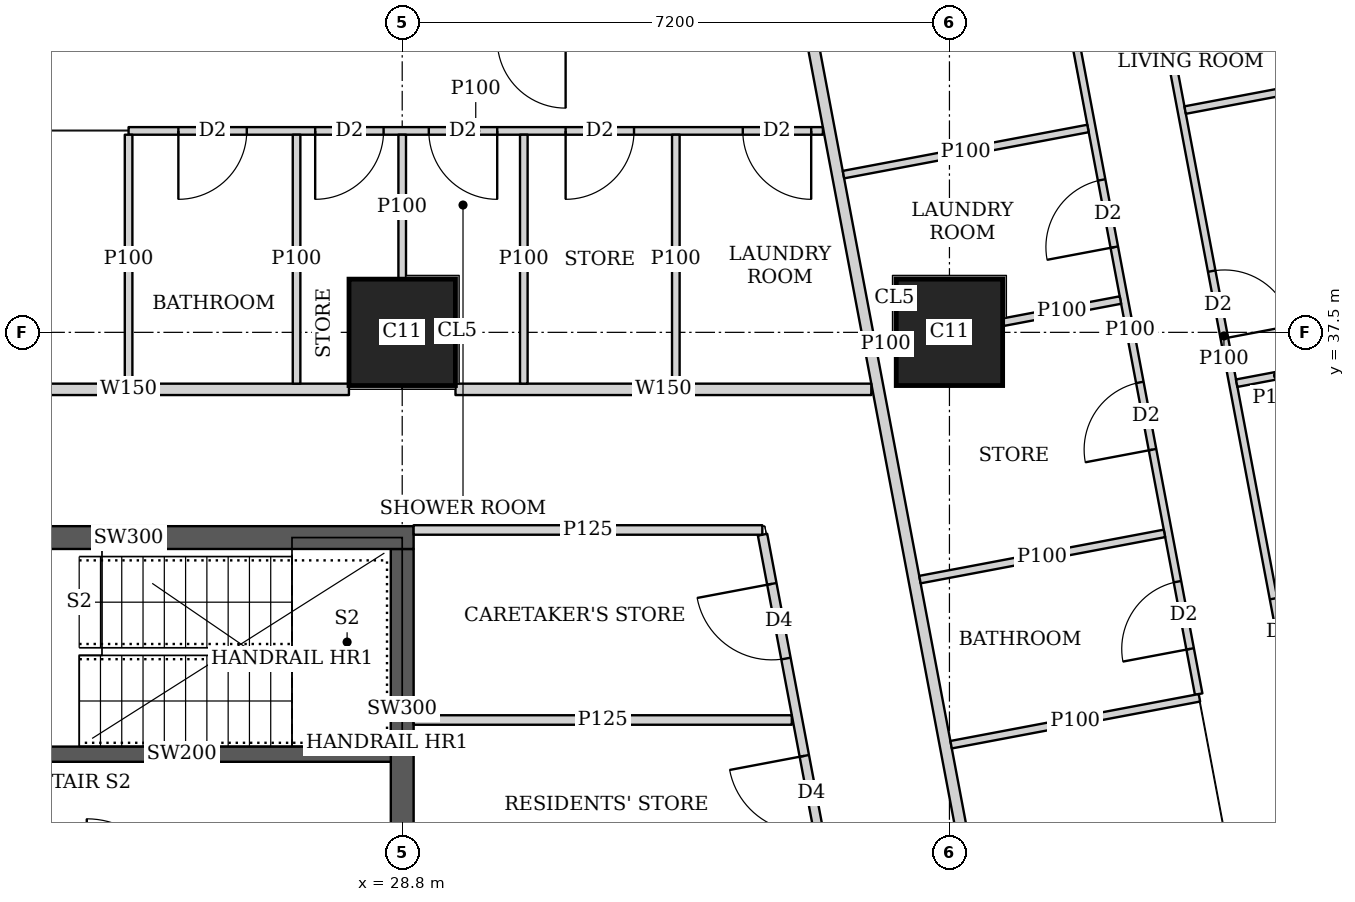
"""IFC4 building model, lengths in metres.
Left out: names, types, materials, properties, quantities, classifications, styles, units other than length and angle.
Written with IfcOpenShell. Run it as: python <this file> out.ifc"""

import sys

from ifc_helpers import new_model, si_unit, direction, frame, frame_2d, origin, origin_2d, place, context, subcontext, project, spatial, rectangle, extrude, element, fill, save


model = new_model("IFC4")
c1 = context("Model", 3, precision=1e-05, world=origin(), true_north=direction((0.0, 1.0)))
c2 = subcontext(c1, "Body", "Model", "MODEL_VIEW")
j1 = project(units=[si_unit("LENGTHUNIT", "METRE"), si_unit("PLANEANGLEUNIT", "RADIAN")], contexts=[c1])
p1 = place(None, origin())
s1 = spatial("IfcSite", under=j1, at=p1, CompositionType="ELEMENT")
p2 = place(p1, origin())
s2 = spatial("IfcBuilding", under=s1, at=p2, CompositionType="ELEMENT")
p3 = place(p2, frame((0.0, 0.0, 242.45)))
s3 = spatial("IfcBuildingStorey", under=s2, at=p3, CompositionType="ELEMENT", Elevation=242.45)
for number, where, z_axis, x_axis in (
    (1, (28.8, 37.5, 0.0), (0.0, 0.0, 1.0), (1.0, 0.0, 0.0)),
    (2, (36.0, 37.5, 0.0), (0.0, 0.0, 1.0), (1.0, 0.0, 0.0)),
):
    element("IfcColumn", number, at=place(p3, frame(where, z_axis=z_axis, x_axis=x_axis)), inside=s3, PredefinedType="COLUMN", context=c2, shape_type="SweptSolid", body=[
        extrude(rectangle(XDim=1.4, YDim=1.4, at=origin_2d()), origin(), (0.0, 0.0, 1.0), 3.75),
    ])
p4 = place(p3, frame((21.45, 34.8, 0.0), z_axis=(0.0, 0.0, 1.0), x_axis=(1.0, 0.0, 0.0)))
e3 = element("IfcWall", 3, at=p4, inside=s3, PredefinedType="SHEAR", context=c2, shape_type="SweptSolid", body=[
    extrude(rectangle(XDim=7.5, YDim=0.3, at=frame_2d((3.75, 0.0))), origin(), (0.0, 0.0, 1.0), 3.75),
])
p5 = place(p4, frame((0.5, 0.0, 0.0)))
e4 = element("IfcOpeningElement", 4, at=p5, cuts=e3, PredefinedType="OPENING", context=c2, shape_type="SweptSolid", body=[
    extrude(rectangle(XDim=1.1, YDim=2.1, at=frame_2d((0.55, 1.05))), frame((0.0, 0.16, 0.0), z_axis=(0.0, -1.0, 0.0), x_axis=(1.0, 0.0, 0.0)), (0.0, 0.0, 1.0), 0.32),
])
p6 = place(p3, frame((28.8, 30.45, 0.0), z_axis=(0.0, 0.0, 1.0), x_axis=(0.0, 1.0, 0.0)))
e5 = element("IfcWall", 5, at=p6, inside=s3, PredefinedType="SHEAR", context=c2, shape_type="SweptSolid", body=[
    extrude(rectangle(XDim=4.2, YDim=0.3, at=frame_2d((2.1, 0.0))), origin(), (0.0, 0.0, 1.0), 3.75),
])
p7 = place(p3, frame((22.301, 36.75, 0.0), z_axis=(0.0, 0.0, 1.0), x_axis=(1.0, 0.0, 0.0)))
e6 = element("IfcWall", 6, at=p7, inside=s3, PredefinedType="SOLIDWALL", context=c2, shape_type="SweptSolid", body=[
    extrude(rectangle(XDim=5.798, YDim=0.15, at=frame_2d((2.899, 0.0))), origin(), (0.0, 0.0, 1.0), 3.45),
])
p8 = place(p7, frame((0.799, 0.0, 0.0)))
e7 = element("IfcOpeningElement", 7, at=p8, cuts=e6, PredefinedType="OPENING", context=c2, shape_type="SweptSolid", body=[
    extrude(rectangle(XDim=1.0, YDim=2.1, at=frame_2d((0.5, 1.05))), frame((0.0, 0.085, 0.0), z_axis=(0.0, -1.0, 0.0), x_axis=(1.0, 0.0, 0.0)), (0.0, 0.0, 1.0), 0.17),
])
p9 = place(p3, frame((29.501, 36.75, 0.0), z_axis=(0.0, 0.0, 1.0), x_axis=(1.0, 0.0, 0.0)))
e8 = element("IfcWall", 8, at=p9, inside=s3, PredefinedType="SOLIDWALL", context=c2, shape_type="SweptSolid", body=[
    extrude(rectangle(XDim=5.471, YDim=0.15, at=frame_2d((2.735, 0.0))), origin(), (0.0, 0.0, 1.0), 3.45),
])
p10 = place(p3, frame((33.933, 42.73, 0.0), z_axis=(0.0, 0.0, 1.0), x_axis=(0.185595417643, -0.982626246825, 0.0)))
e9 = element("IfcWall", 9, at=p10, inside=s3, PredefinedType="SOLIDWALL", context=c2, shape_type="SweptSolid", body=[
    extrude(rectangle(XDim=41.051, YDim=0.15, at=frame_2d((20.525, 0.0))), origin(), (0.0, 0.0, 1.0), 2.45),
])
p11 = place(p10, frame((12.266, 0.0, 0.0)))
e10 = element("IfcOpeningElement", 10, at=p11, cuts=e9, PredefinedType="OPENING", context=c2, shape_type="SweptSolid", body=[
    extrude(rectangle(XDim=1.0, YDim=2.1, at=frame_2d((0.5, 1.05))), frame((0.0, 0.085, 0.0), z_axis=(0.0, -1.0, 0.0), x_axis=(1.0, 0.0, 0.0)), (0.0, 0.0, 1.0), 0.17),
])
p12 = place(p10, frame((16.082, 0.0, 0.0)))
e11 = element("IfcOpeningElement", 11, at=p12, cuts=e9, PredefinedType="OPENING", context=c2, shape_type="SweptSolid", body=[
    extrude(rectangle(XDim=1.0, YDim=2.1, at=frame_2d((0.5, 1.05))), frame((0.0, 0.085, 0.0), z_axis=(0.0, -1.0, 0.0), x_axis=(1.0, 0.0, 0.0)), (0.0, 0.0, 1.0), 0.17),
])
p13 = place(p10, frame((30.862, 0.0, 0.0)))
e12 = element("IfcOpeningElement", 12, at=p13, cuts=e9, PredefinedType="OPENING", context=c2, shape_type="SweptSolid", body=[
    extrude(rectangle(XDim=1.0, YDim=2.1, at=frame_2d((0.5, 1.05))), frame((0.0, 0.085, 0.0), z_axis=(0.0, -1.0, 0.0), x_axis=(1.0, 0.0, 0.0)), (0.0, 0.0, 1.0), 0.17),
])
p14 = place(p3, frame((38.764, 41.941, 0.0), z_axis=(0.0, 0.0, 1.0), x_axis=(0.185548572312, -0.982635093671, 0.0)))
e13 = element("IfcWall", 13, at=p14, inside=s3, PredefinedType="PARTITIONING", context=c2, shape_type="SweptSolid", body=[
    extrude(rectangle(XDim=9.135, YDim=0.1, at=frame_2d((4.568, 0.0))), origin(), (0.0, 0.0, 1.0), 3.45),
])
p15 = place(p14, frame((8.085, 0.0, 0.0)))
e14 = element("IfcOpeningElement", 14, at=p15, cuts=e13, PredefinedType="OPENING", context=c2, shape_type="SweptSolid", body=[
    extrude(rectangle(XDim=0.9, YDim=2.1, at=frame_2d((0.45, 1.05))), frame((0.0, 0.06, 0.0), z_axis=(0.0, -1.0, 0.0), x_axis=(1.0, 0.0, 0.0)), (0.0, 0.0, 1.0), 0.12),
])
p16 = place(p14, frame((3.7, 0.0, 0.0)))
e15 = element("IfcOpeningElement", 15, at=p16, cuts=e13, PredefinedType="OPENING", context=c2, shape_type="SweptSolid", body=[
    extrude(rectangle(XDim=0.9, YDim=2.1, at=frame_2d((0.45, 1.05))), frame((0.0, 0.06, 0.0), z_axis=(0.0, -1.0, 0.0), x_axis=(1.0, 0.0, 0.0)), (0.0, 0.0, 1.0), 0.12),
])
p17 = place(p3, frame((37.473, 42.309, 0.0), z_axis=(0.0, 0.0, 1.0), x_axis=(0.185491912953, -0.982645790827, 0.0)))
e16 = element("IfcWall", 16, at=p17, inside=s3, PredefinedType="PARTITIONING", context=c2, shape_type="SweptSolid", body=[
    extrude(rectangle(XDim=9.737, YDim=0.1, at=frame_2d((4.869, 0.0))), origin(), (0.0, 0.0, 1.0), 3.45),
])
p18 = place(p17, frame((8.232, 0.0, 0.0)))
e17 = element("IfcOpeningElement", 17, at=p18, cuts=e16, PredefinedType="OPENING", context=c2, shape_type="SweptSolid", body=[
    extrude(rectangle(XDim=0.9, YDim=2.1, at=frame_2d((0.45, 1.05))), frame((0.0, 0.06, 0.0), z_axis=(0.0, -1.0, 0.0), x_axis=(1.0, 0.0, 0.0)), (0.0, 0.0, 1.0), 0.12),
])
p19 = place(p17, frame((2.853, 0.0, 0.0)))
e18 = element("IfcOpeningElement", 18, at=p19, cuts=e16, PredefinedType="OPENING", context=c2, shape_type="SweptSolid", body=[
    extrude(rectangle(XDim=0.9, YDim=2.1, at=frame_2d((0.45, 1.05))), frame((0.0, 0.06, 0.0), z_axis=(0.0, -1.0, 0.0), x_axis=(1.0, 0.0, 0.0)), (0.0, 0.0, 1.0), 0.12),
])
p20 = place(p17, frame((5.564, 0.0, 0.0)))
e19 = element("IfcOpeningElement", 19, at=p20, cuts=e16, PredefinedType="OPENING", context=c2, shape_type="SweptSolid", body=[
    extrude(rectangle(XDim=0.9, YDim=2.1, at=frame_2d((0.45, 1.05))), frame((0.0, 0.06, 0.0), z_axis=(0.0, -1.0, 0.0), x_axis=(1.0, 0.0, 0.0)), (0.0, 0.0, 1.0), 0.12),
])
p21 = place(p3, frame((43.277, 41.212, 0.0), z_axis=(0.0, 0.0, 1.0), x_axis=(-0.982665405803, -0.185387972203, 0.0)))
e20 = element("IfcWall", 20, at=p21, inside=s3, PredefinedType="PARTITIONING", context=c2, shape_type="SweptSolid", body=[
    extrude(rectangle(XDim=4.25, YDim=0.1, at=frame_2d((2.125, 0.0))), origin(), (0.0, 0.0, 1.0), 2.0),
])
p22 = place(p3, frame((40.854, 37.034, 0.0), z_axis=(0.0, 0.0, 1.0), x_axis=(-0.982651678759, -0.185460718839, 0.0)))
e21 = element("IfcWall", 21, at=p22, inside=s3, PredefinedType="PARTITIONING", context=c2, shape_type="SweptSolid", body=[
    extrude(rectangle(XDim=1.094, YDim=0.1, at=frame_2d((0.547, 0.0))), origin(), (0.0, 0.0, 1.0), 3.45),
])
p23 = place(p3, frame((37.823, 40.182, 0.0), z_axis=(0.0, 0.0, 1.0), x_axis=(-0.982664729897, -0.18539155487, 0.0)))
e22 = element("IfcWall", 22, at=p23, inside=s3, PredefinedType="PARTITIONING", context=c2, shape_type="SweptSolid", body=[
    extrude(rectangle(XDim=3.274, YDim=0.1, at=frame_2d((1.637, 0.0))), origin(), (0.0, 0.0, 1.0), 3.45),
])
p24 = place(p3, frame((38.25, 37.925, 0.0), z_axis=(0.0, 0.0, 1.0), x_axis=(-0.982610209589, -0.185680305934, 0.0)))
e23 = element("IfcWall", 23, at=p24, inside=s3, PredefinedType="PARTITIONING", context=c2, shape_type="SweptSolid", body=[
    extrude(rectangle(XDim=1.567, YDim=0.1, at=frame_2d((0.784, 0.0))), origin(), (0.0, 0.0, 1.0), 3.45),
])
p25 = place(p3, frame((35.29, 37.366, 0.0), z_axis=(0.0, 0.0, 1.0), x_axis=(-0.982395465615, -0.18681313963, 0.0)))
e24 = element("IfcWall", 24, at=p25, inside=s3, PredefinedType="PARTITIONING", context=c2, shape_type="SweptSolid", body=[
    extrude(rectangle(XDim=0.263, YDim=0.1, at=frame_2d((0.131, 0.0))), origin(), (0.0, 0.0, 1.0), 3.45),
])
p26 = place(p3, frame((39.289, 32.692, 0.0), z_axis=(0.0, 0.0, 1.0), x_axis=(-0.982633623707, -0.185556356831, 0.0)))
e25 = element("IfcWall", 25, at=p26, inside=s3, PredefinedType="PARTITIONING", context=c2, shape_type="SweptSolid", body=[
    extrude(rectangle(XDim=3.325, YDim=0.1, at=frame_2d((1.663, 0.0))), origin(), (0.0, 0.0, 1.0), 3.45),
])
p27 = place(p3, frame((38.829, 34.855, 0.0), z_axis=(0.0, 0.0, 1.0), x_axis=(-0.982610347627, -0.185679575441, 0.0)))
e26 = element("IfcWall", 26, at=p27, inside=s3, PredefinedType="PARTITIONING", context=c2, shape_type="SweptSolid", body=[
    extrude(rectangle(XDim=3.274, YDim=0.1, at=frame_2d((1.637, 0.0))), origin(), (0.0, 0.0, 1.0), 3.45),
])
p28 = place(p3, frame((25.2, 40.15, 0.0), z_axis=(0.0, 0.0, 1.0), x_axis=(1.0, 0.0, 0.0)))
e27 = element("IfcWall", 27, at=p28, inside=s3, PredefinedType="PARTITIONING", context=c2, shape_type="SweptSolid", body=[
    extrude(rectangle(XDim=9.135, YDim=0.1, at=frame_2d((4.567, 0.0))), origin(), (0.0, 0.0, 1.0), 3.45),
])
p29 = place(p28, frame((0.655, 0.0, 0.0)))
e28 = element("IfcOpeningElement", 28, at=p29, cuts=e27, PredefinedType="OPENING", context=c2, shape_type="SweptSolid", body=[
    extrude(rectangle(XDim=0.9, YDim=2.1, at=frame_2d((0.45, 1.05))), frame((0.0, 0.06, 0.0), z_axis=(0.0, -1.0, 0.0), x_axis=(1.0, 0.0, 0.0)), (0.0, 0.0, 1.0), 0.12),
])
p30 = place(p28, frame((3.95, 0.0, 0.0)))
e29 = element("IfcOpeningElement", 29, at=p30, cuts=e27, PredefinedType="OPENING", context=c2, shape_type="SweptSolid", body=[
    extrude(rectangle(XDim=0.9, YDim=2.1, at=frame_2d((0.45, 1.05))), frame((0.0, 0.06, 0.0), z_axis=(0.0, -1.0, 0.0), x_axis=(1.0, 0.0, 0.0)), (0.0, 0.0, 1.0), 0.12),
])
p31 = place(p28, frame((8.081, 0.0, 0.0)))
e30 = element("IfcOpeningElement", 30, at=p31, cuts=e27, PredefinedType="OPENING", context=c2, shape_type="SweptSolid", body=[
    extrude(rectangle(XDim=0.9, YDim=2.1, at=frame_2d((0.45, 1.05))), frame((0.0, 0.06, 0.0), z_axis=(0.0, -1.0, 0.0), x_axis=(1.0, 0.0, 0.0)), (0.0, 0.0, 1.0), 0.12),
])
p32 = place(p28, frame((2.455, 0.0, 0.0)))
e31 = element("IfcOpeningElement", 31, at=p32, cuts=e27, PredefinedType="OPENING", context=c2, shape_type="SweptSolid", body=[
    extrude(rectangle(XDim=0.9, YDim=2.1, at=frame_2d((0.45, 1.05))), frame((0.0, 0.06, 0.0), z_axis=(0.0, -1.0, 0.0), x_axis=(1.0, 0.0, 0.0)), (0.0, 0.0, 1.0), 0.12),
])
p33 = place(p28, frame((5.75, 0.0, 0.0)))
e32 = element("IfcOpeningElement", 32, at=p33, cuts=e27, PredefinedType="OPENING", context=c2, shape_type="SweptSolid", body=[
    extrude(rectangle(XDim=0.9, YDim=2.1, at=frame_2d((0.45, 1.05))), frame((0.0, 0.06, 0.0), z_axis=(0.0, -1.0, 0.0), x_axis=(1.0, 0.0, 0.0)), (0.0, 0.0, 1.0), 0.12),
])
p34 = place(p3, frame((25.2, 36.825, 0.0), z_axis=(0.0, 0.0, 1.0), x_axis=(0.0, 1.0, 0.0)))
e33 = element("IfcWall", 33, at=p34, inside=s3, PredefinedType="PARTITIONING", context=c2, shape_type="SweptSolid", body=[
    extrude(rectangle(XDim=3.275, YDim=0.1, at=frame_2d((1.638, 0.0))), origin(), (0.0, 0.0, 1.0), 3.45),
])
p35 = place(p3, frame((28.8, 38.201, 0.0), z_axis=(0.0, 0.0, 1.0), x_axis=(0.0, 1.0, 0.0)))
e34 = element("IfcWall", 34, at=p35, inside=s3, PredefinedType="PARTITIONING", context=c2, shape_type="SweptSolid", body=[
    extrude(rectangle(XDim=1.899, YDim=0.1, at=frame_2d((0.95, 0.0))), origin(), (0.0, 0.0, 1.0), 3.45),
])
for number, where, z_axis, x_axis in (
    (35, (32.4, 36.825, 0.0), (0.0, 0.0, 1.0), (0.0, 1.0, 0.0)),
    (36, (27.41, 36.825, 0.0), (0.0, 0.0, 1.0), (0.0, 1.0, 0.0)),
    (37, (30.4, 36.825, 0.0), (0.0, 0.0, 1.0), (0.0, 1.0, 0.0)),
):
    element("IfcWall", number, at=place(p3, frame(where, z_axis=z_axis, x_axis=x_axis)), inside=s3, PredefinedType="PARTITIONING", context=c2, shape_type="SweptSolid", body=[
        extrude(rectangle(XDim=3.275, YDim=0.1, at=frame_2d((1.638, 0.0))), origin(), (0.0, 0.0, 1.0), 3.45),
    ])
p36 = place(p3, frame((28.95, 34.9, 0.0), z_axis=(0.0, 0.0, 1.0), x_axis=(1.0, 0.0, 0.0)))
e38 = element("IfcWall", 38, at=p36, inside=s3, PredefinedType="PARTITIONING", context=c2, shape_type="SweptSolid", body=[
    extrude(rectangle(XDim=4.588, YDim=0.125, at=frame_2d((2.294, 0.0))), origin(), (0.0, 0.0, 1.0), 3.45),
])
p37 = place(p3, frame((38.202, 10.163, 0.0), z_axis=(0.0, 0.0, 1.0), x_axis=(-0.185610321132, 0.982623431783, 0.0)))
e39 = element("IfcWall", 39, at=p37, inside=s3, PredefinedType="PARTITIONING", context=c2, shape_type="SweptSolid", body=[
    extrude(rectangle(XDim=25.111, YDim=0.125, at=frame_2d((12.556, 0.0))), origin(), (0.0, 0.0, 1.0), 2.45),
])
p38 = place(p37, frame((0.708, 0.0, 0.0)))
e40 = element("IfcOpeningElement", 40, at=p38, cuts=e39, PredefinedType="OPENING", context=c2, shape_type="SweptSolid", body=[
    extrude(rectangle(XDim=1.0, YDim=2.1, at=frame_2d((0.5, 1.05))), frame((0.0, 0.073, 0.0), z_axis=(0.0, -1.0, 0.0), x_axis=(1.0, 0.0, 0.0)), (0.0, 0.0, 1.0), 0.145),
])
p39 = place(p37, frame((13.378, 0.0, 0.0)))
e41 = element("IfcOpeningElement", 41, at=p39, cuts=e39, PredefinedType="OPENING", context=c2, shape_type="SweptSolid", body=[
    extrude(rectangle(XDim=1.0, YDim=2.1, at=frame_2d((0.5, 1.05))), frame((0.0, 0.073, 0.0), z_axis=(0.0, -1.0, 0.0), x_axis=(1.0, 0.0, 0.0)), (0.0, 0.0, 1.0), 0.145),
])
p40 = place(p37, frame((21.15, 0.0, 0.0)))
e42 = element("IfcOpeningElement", 42, at=p40, cuts=e39, PredefinedType="OPENING", context=c2, shape_type="SweptSolid", body=[
    extrude(rectangle(XDim=1.0, YDim=2.1, at=frame_2d((0.5, 1.05))), frame((0.0, 0.073, 0.0), z_axis=(0.0, -1.0, 0.0), x_axis=(1.0, 0.0, 0.0)), (0.0, 0.0, 1.0), 0.145),
])
p41 = place(p37, frame((23.453, 0.0, 0.0)))
e43 = element("IfcOpeningElement", 43, at=p41, cuts=e39, PredefinedType="OPENING", context=c2, shape_type="SweptSolid", body=[
    extrude(rectangle(XDim=1.0, YDim=2.1, at=frame_2d((0.5, 1.05))), frame((0.0, 0.073, 0.0), z_axis=(0.0, -1.0, 0.0), x_axis=(1.0, 0.0, 0.0)), (0.0, 0.0, 1.0), 0.145),
])
p42 = place(p3, frame((28.95, 32.4, 0.0), z_axis=(0.0, 0.0, 1.0), x_axis=(1.0, 0.0, 0.0)))
e44 = element("IfcWall", 44, at=p42, inside=s3, PredefinedType="PARTITIONING", context=c2, shape_type="SweptSolid", body=[
    extrude(rectangle(XDim=4.976, YDim=0.125, at=frame_2d((2.488, 0.0))), origin(), (0.0, 0.0, 1.0), 3.45),
])
p43 = place(p3, frame((23.0, 31.95, 0.0), z_axis=(0.0, 0.0, 1.0), x_axis=(1.0, 0.0, 0.0)))
e45 = element("IfcWall", 45, at=p43, inside=s3, PredefinedType="SHEAR", context=c2, shape_type="SweptSolid", body=[
    extrude(rectangle(XDim=5.8, YDim=0.2, at=frame_2d((2.9, 0.0))), origin(), (0.0, 0.0, 1.0), 3.75),
])
p44 = place(p15, origin())
e46 = element("IfcDoor", 46, at=p44, inside=s3, OperationType="SINGLE_SWING_RIGHT", PredefinedType="DOOR", context=c2, shape_type="SweptSolid", body=[
    extrude(rectangle(XDim=0.9, YDim=2.1, at=frame_2d((0.45, 1.05))), frame((0.0, 0.025, 0.0), z_axis=(0.0, -1.0, 0.0), x_axis=(1.0, 0.0, 0.0)), (0.0, 0.0, 1.0), 0.05),
])
fill(e14, e46)
p45 = place(p16, origin())
e47 = element("IfcDoor", 47, at=p45, inside=s3, OperationType="SINGLE_SWING_RIGHT", PredefinedType="DOOR", context=c2, shape_type="SweptSolid", body=[
    extrude(rectangle(XDim=0.9, YDim=2.1, at=frame_2d((0.45, 1.05))), frame((0.0, 0.025, 0.0), z_axis=(0.0, -1.0, 0.0), x_axis=(1.0, 0.0, 0.0)), (0.0, 0.0, 1.0), 0.05),
])
fill(e15, e47)
p46 = place(p18, origin())
e48 = element("IfcDoor", 48, at=p46, inside=s3, OperationType="SINGLE_SWING_LEFT", PredefinedType="DOOR", context=c2, shape_type="SweptSolid", body=[
    extrude(rectangle(XDim=0.9, YDim=2.1, at=frame_2d((0.45, 1.05))), frame((0.0, 0.025, 0.0), z_axis=(0.0, -1.0, 0.0), x_axis=(1.0, 0.0, 0.0)), (0.0, 0.0, 1.0), 0.05),
])
fill(e17, e48)
p47 = place(p19, origin())
e49 = element("IfcDoor", 49, at=p47, inside=s3, OperationType="SINGLE_SWING_LEFT", PredefinedType="DOOR", context=c2, shape_type="SweptSolid", body=[
    extrude(rectangle(XDim=0.9, YDim=2.1, at=frame_2d((0.45, 1.05))), frame((0.0, 0.025, 0.0), z_axis=(0.0, -1.0, 0.0), x_axis=(1.0, 0.0, 0.0)), (0.0, 0.0, 1.0), 0.05),
])
fill(e18, e49)
p48 = place(p20, origin())
e50 = element("IfcDoor", 50, at=p48, inside=s3, OperationType="SINGLE_SWING_LEFT", PredefinedType="DOOR", context=c2, shape_type="SweptSolid", body=[
    extrude(rectangle(XDim=0.9, YDim=2.1, at=frame_2d((0.45, 1.05))), frame((0.0, 0.025, 0.0), z_axis=(0.0, -1.0, 0.0), x_axis=(1.0, 0.0, 0.0)), (0.0, 0.0, 1.0), 0.05),
])
fill(e19, e50)
p49 = place(p29, origin())
e51 = element("IfcDoor", 51, at=p49, inside=s3, OperationType="SINGLE_SWING_RIGHT", PredefinedType="DOOR", context=c2, shape_type="SweptSolid", body=[
    extrude(rectangle(XDim=0.9, YDim=2.1, at=frame_2d((0.45, 1.05))), frame((0.0, 0.025, 0.0), z_axis=(0.0, -1.0, 0.0), x_axis=(1.0, 0.0, 0.0)), (0.0, 0.0, 1.0), 0.05),
])
fill(e28, e51)
p50 = place(p30, origin())
e52 = element("IfcDoor", 52, at=p50, inside=s3, OperationType="SINGLE_SWING_LEFT", PredefinedType="DOOR", context=c2, shape_type="SweptSolid", body=[
    extrude(rectangle(XDim=0.9, YDim=2.1, at=frame_2d((0.45, 1.05))), frame((0.0, 0.025, 0.0), z_axis=(0.0, -1.0, 0.0), x_axis=(1.0, 0.0, 0.0)), (0.0, 0.0, 1.0), 0.05),
])
fill(e29, e52)
p51 = place(p31, origin())
e53 = element("IfcDoor", 53, at=p51, inside=s3, OperationType="SINGLE_SWING_LEFT", PredefinedType="DOOR", context=c2, shape_type="SweptSolid", body=[
    extrude(rectangle(XDim=0.9, YDim=2.1, at=frame_2d((0.45, 1.05))), frame((0.0, 0.025, 0.0), z_axis=(0.0, -1.0, 0.0), x_axis=(1.0, 0.0, 0.0)), (0.0, 0.0, 1.0), 0.05),
])
fill(e30, e53)
p52 = place(p32, origin())
e54 = element("IfcDoor", 54, at=p52, inside=s3, OperationType="SINGLE_SWING_RIGHT", PredefinedType="DOOR", context=c2, shape_type="SweptSolid", body=[
    extrude(rectangle(XDim=0.9, YDim=2.1, at=frame_2d((0.45, 1.05))), frame((0.0, 0.025, 0.0), z_axis=(0.0, -1.0, 0.0), x_axis=(1.0, 0.0, 0.0)), (0.0, 0.0, 1.0), 0.05),
])
fill(e31, e54)
p53 = place(p33, origin())
e55 = element("IfcDoor", 55, at=p53, inside=s3, OperationType="SINGLE_SWING_RIGHT", PredefinedType="DOOR", context=c2, shape_type="SweptSolid", body=[
    extrude(rectangle(XDim=0.9, YDim=2.1, at=frame_2d((0.45, 1.05))), frame((0.0, 0.025, 0.0), z_axis=(0.0, -1.0, 0.0), x_axis=(1.0, 0.0, 0.0)), (0.0, 0.0, 1.0), 0.05),
])
fill(e32, e55)
p54 = place(p40, origin())
e56 = element("IfcDoor", 56, at=p54, inside=s3, OperationType="SINGLE_SWING_RIGHT", PredefinedType="DOOR", context=c2, shape_type="SweptSolid", body=[
    extrude(rectangle(XDim=1.0, YDim=2.1, at=frame_2d((0.5, 1.05))), frame((0.0, 0.025, 0.0), z_axis=(0.0, -1.0, 0.0), x_axis=(1.0, 0.0, 0.0)), (0.0, 0.0, 1.0), 0.05),
])
fill(e42, e56)
p55 = place(p41, origin())
e57 = element("IfcDoor", 57, at=p55, inside=s3, OperationType="SINGLE_SWING_RIGHT", PredefinedType="DOOR", context=c2, shape_type="SweptSolid", body=[
    extrude(rectangle(XDim=1.0, YDim=2.1, at=frame_2d((0.5, 1.05))), frame((0.0, 0.025, 0.0), z_axis=(0.0, -1.0, 0.0), x_axis=(1.0, 0.0, 0.0)), (0.0, 0.0, 1.0), 0.05),
])
fill(e43, e57)
save(model, sys.argv[1])
